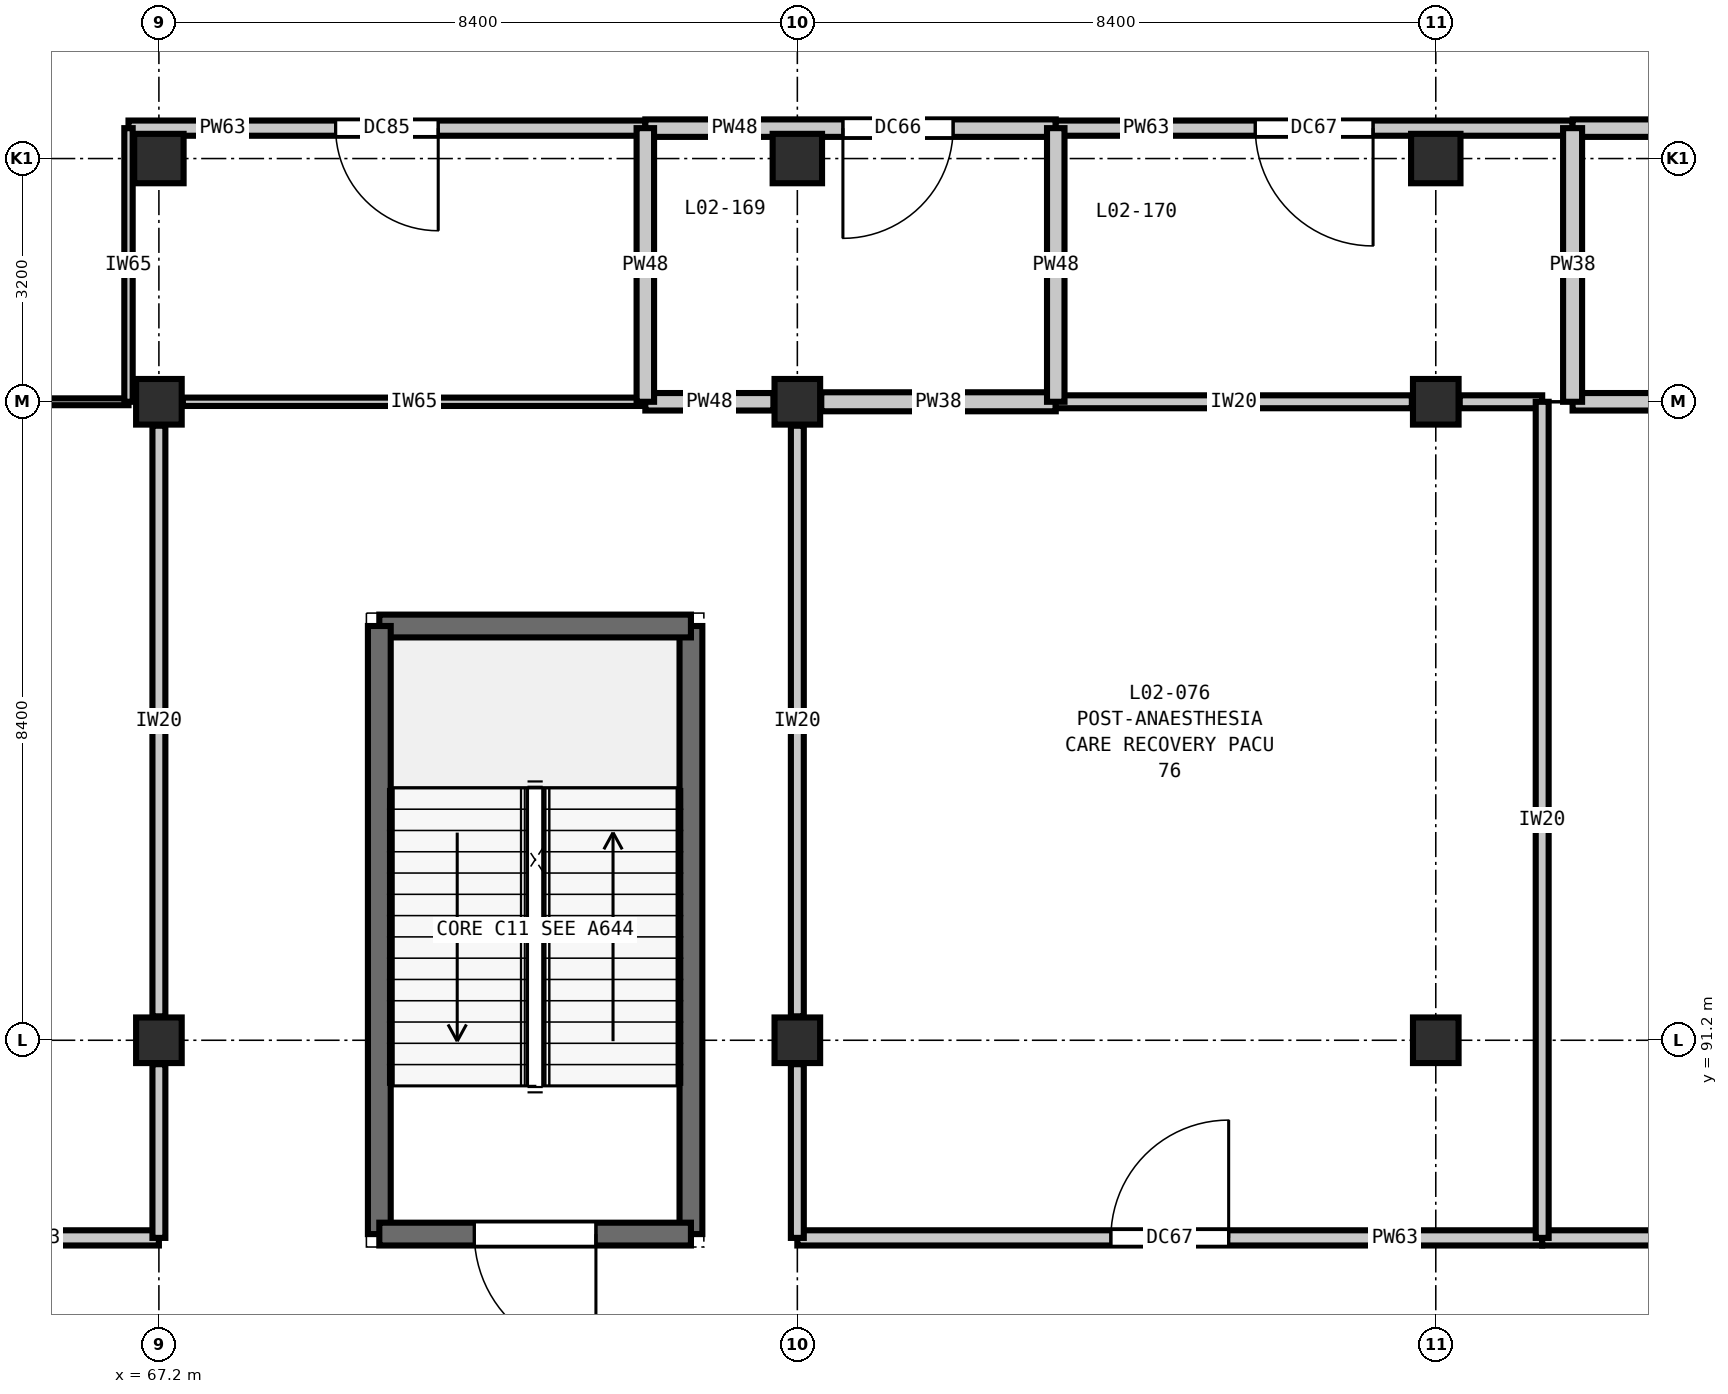
"""IFC4 building model, lengths in metres.
Left out: names, types, materials, properties, quantities, classifications, styles, units other than length and angle.
Written with IfcOpenShell. Run it as: python <this file> out.ifc"""

import sys

from ifc_helpers import new_model, si_unit, direction, frame, frame_2d, origin, origin_2d, place, context, subcontext, project, spatial, rectangle, extrude, element, fill, save


model = new_model("IFC4")
c1 = context("Model", 3, precision=1e-05, world=origin(), true_north=direction((0.0, 1.0)))
c2 = subcontext(c1, "Body", "Model", "MODEL_VIEW")
j1 = project(units=[si_unit("LENGTHUNIT", "METRE"), si_unit("PLANEANGLEUNIT", "RADIAN")], contexts=[c1])
p1 = place(None, origin())
s1 = spatial("IfcSite", under=j1, at=p1, CompositionType="ELEMENT")
p2 = place(p1, origin())
s2 = spatial("IfcBuilding", under=s1, at=p2, CompositionType="ELEMENT")
p3 = place(p2, frame((0.0, 0.0, 10.8)))
s3 = spatial("IfcBuildingStorey", under=s2, at=p3, CompositionType="ELEMENT", Elevation=10.8)
for number, where, z_axis, x_axis in (
    (1, (67.2, 91.2, 0.0), (0.0, 0.0, 1.0), (1.0, 0.0, 0.0)),
    (2, (67.2, 99.6, 0.0), (0.0, 0.0, 1.0), (1.0, 0.0, 0.0)),
):
    element("IfcColumn", number, at=place(p3, frame(where, z_axis=z_axis, x_axis=x_axis)), inside=s3, PredefinedType="COLUMN", context=c2, shape_type="SweptSolid", body=[
        extrude(rectangle(XDim=0.6, YDim=0.6, at=origin_2d()), origin(), (0.0, 0.0, 1.0), 5.4),
    ])
p4 = place(p3, frame((67.2, 102.8, 0.0), z_axis=(0.0, 0.0, 1.0), x_axis=(1.0, 0.0, 0.0)))
e3 = element("IfcColumn", 3, at=p4, inside=s3, PredefinedType="COLUMN", context=c2, shape_type="SweptSolid", body=[
    extrude(rectangle(XDim=0.65, YDim=0.65, at=origin_2d()), origin(), (0.0, 0.0, 1.0), 5.4),
])
for number, where, z_axis, x_axis in (
    (4, (75.6, 91.2, 0.0), (0.0, 0.0, 1.0), (1.0, 0.0, 0.0)),
    (5, (75.6, 99.6, 0.0), (0.0, 0.0, 1.0), (1.0, 0.0, 0.0)),
):
    element("IfcColumn", number, at=place(p3, frame(where, z_axis=z_axis, x_axis=x_axis)), inside=s3, PredefinedType="COLUMN", context=c2, shape_type="SweptSolid", body=[
        extrude(rectangle(XDim=0.6, YDim=0.6, at=origin_2d()), origin(), (0.0, 0.0, 1.0), 5.4),
    ])
p5 = place(p3, frame((75.6, 102.8, 0.0), z_axis=(0.0, 0.0, 1.0), x_axis=(1.0, 0.0, 0.0)))
e6 = element("IfcColumn", 6, at=p5, inside=s3, PredefinedType="COLUMN", context=c2, shape_type="SweptSolid", body=[
    extrude(rectangle(XDim=0.65, YDim=0.65, at=origin_2d()), origin(), (0.0, 0.0, 1.0), 5.4),
])
for number, where, z_axis, x_axis in (
    (7, (84.0, 91.2, 0.0), (0.0, 0.0, 1.0), (1.0, 0.0, 0.0)),
    (8, (84.0, 99.6, 0.0), (0.0, 0.0, 1.0), (1.0, 0.0, 0.0)),
):
    element("IfcColumn", number, at=place(p3, frame(where, z_axis=z_axis, x_axis=x_axis)), inside=s3, PredefinedType="COLUMN", context=c2, shape_type="SweptSolid", body=[
        extrude(rectangle(XDim=0.6, YDim=0.6, at=origin_2d()), origin(), (0.0, 0.0, 1.0), 5.4),
    ])
p6 = place(p3, frame((84.0, 102.8, 0.0), z_axis=(0.0, 0.0, 1.0), x_axis=(1.0, 0.0, 0.0)))
e9 = element("IfcColumn", 9, at=p6, inside=s3, PredefinedType="COLUMN", context=c2, shape_type="SweptSolid", body=[
    extrude(rectangle(XDim=0.65, YDim=0.65, at=origin_2d()), origin(), (0.0, 0.0, 1.0), 5.4),
])
p7 = place(p3, frame((74.2, 88.65, 0.0), z_axis=(0.0, 0.0, 1.0), x_axis=(0.0, 1.0, 0.0)))
e10 = element("IfcWall", 10, at=p7, inside=s3, PredefinedType="SHEAR", context=c2, shape_type="SweptSolid", body=[
    extrude(rectangle(XDim=8.0, YDim=0.3, at=frame_2d((4.0, 0.0))), origin(), (0.0, 0.0, 1.0), 5.4),
])
p8 = place(p3, frame((74.2, 96.65, 0.0), z_axis=(0.0, 0.0, 1.0), x_axis=(-1.0, 0.0, 0.0)))
e11 = element("IfcWall", 11, at=p8, inside=s3, PredefinedType="SHEAR", context=c2, shape_type="SweptSolid", body=[
    extrude(rectangle(XDim=4.1, YDim=0.3, at=frame_2d((2.05, 0.0))), origin(), (0.0, 0.0, 1.0), 5.4),
])
p9 = place(p3, frame((70.1, 96.65, 0.0), z_axis=(0.0, 0.0, 1.0), x_axis=(0.0, -1.0, 0.0)))
e12 = element("IfcWall", 12, at=p9, inside=s3, PredefinedType="SHEAR", context=c2, shape_type="SweptSolid", body=[
    extrude(rectangle(XDim=8.0, YDim=0.3, at=frame_2d((4.0, 0.0))), origin(), (0.0, 0.0, 1.0), 5.4),
])
p10 = place(p3, frame((70.1, 88.65, 0.0), z_axis=(0.0, 0.0, 1.0), x_axis=(1.0, 0.0, 0.0)))
e13 = element("IfcWall", 13, at=p10, inside=s3, PredefinedType="SHEAR", context=c2, shape_type="SweptSolid", body=[
    extrude(rectangle(XDim=4.1, YDim=0.3, at=frame_2d((2.05, 0.0))), origin(), (0.0, 0.0, 1.0), 5.4),
])
p11 = place(p10, frame((1.25, 0.0, 0.0)))
e14 = element("IfcOpeningElement", 14, at=p11, cuts=e13, PredefinedType="OPENING", context=c2, shape_type="SweptSolid", body=[
    extrude(rectangle(XDim=1.6, YDim=2.25, at=frame_2d((0.8, 1.125))), frame((0.0, 0.16, 0.0), z_axis=(0.0, -1.0, 0.0), x_axis=(1.0, 0.0, 0.0)), (0.0, 0.0, 1.0), 0.32),
])
p12 = place(p3, frame((58.8, 88.6, 0.0), z_axis=(0.0, 0.0, 1.0), x_axis=(1.0, 0.0, 0.0)))
e15 = element("IfcWall", 15, at=p12, inside=s3, PredefinedType="PARTITIONING", context=c2, shape_type="SweptSolid", body=[
    extrude(rectangle(XDim=8.4, YDim=0.2, at=frame_2d((4.2, 0.0))), origin(), (0.0, 0.0, 1.0), 5.07),
])
p13 = place(p12, frame((3.475, 0.0, 0.0)))
e16 = element("IfcOpeningElement", 16, at=p13, cuts=e15, PredefinedType="OPENING", context=c2, shape_type="SweptSolid", body=[
    extrude(rectangle(XDim=1.45, YDim=2.25, at=frame_2d((0.725, 1.125))), frame((0.0, 0.11, 0.0), z_axis=(0.0, -1.0, 0.0), x_axis=(1.0, 0.0, 0.0)), (0.0, 0.0, 1.0), 0.22),
])
p14 = place(p3, frame((75.6, 88.6, 0.0), z_axis=(0.0, 0.0, 1.0), x_axis=(1.0, 0.0, 0.0)))
e17 = element("IfcWall", 17, at=p14, inside=s3, PredefinedType="PARTITIONING", context=c2, shape_type="SweptSolid", body=[
    extrude(rectangle(XDim=9.8, YDim=0.2, at=frame_2d((4.9, 0.0))), origin(), (0.0, 0.0, 1.0), 5.07),
])
p15 = place(p14, frame((4.125, 0.0, 0.0)))
e18 = element("IfcOpeningElement", 18, at=p15, cuts=e17, PredefinedType="OPENING", context=c2, shape_type="SweptSolid", body=[
    extrude(rectangle(XDim=1.55, YDim=2.25, at=frame_2d((0.775, 1.125))), frame((0.0, 0.11, 0.0), z_axis=(0.0, -1.0, 0.0), x_axis=(1.0, 0.0, 0.0)), (0.0, 0.0, 1.0), 0.22),
])
p16 = place(p3, frame((85.4, 88.6, 0.0), z_axis=(0.0, 0.0, 1.0), x_axis=(1.0, 0.0, 0.0)))
e19 = element("IfcWall", 19, at=p16, inside=s3, PredefinedType="PARTITIONING", context=c2, shape_type="SweptSolid", body=[
    extrude(rectangle(XDim=8.4, YDim=0.2, at=frame_2d((4.2, 0.0))), origin(), (0.0, 0.0, 1.0), 5.07),
])
p17 = place(p16, frame((3.35, 0.0, 0.0)))
e20 = element("IfcOpeningElement", 20, at=p17, cuts=e19, PredefinedType="OPENING", context=c2, shape_type="SweptSolid", body=[
    extrude(rectangle(XDim=1.7, YDim=2.3, at=frame_2d((0.85, 1.15))), frame((0.0, 0.11, 0.0), z_axis=(0.0, -1.0, 0.0), x_axis=(1.0, 0.0, 0.0)), (0.0, 0.0, 1.0), 0.22),
])
p18 = place(p3, frame((63.6, 99.6, 0.0), z_axis=(0.0, 0.0, 1.0), x_axis=(1.0, 0.0, 0.0)))
e21 = element("IfcWall", 21, at=p18, inside=s3, PredefinedType="PARTITIONING", context=c2, shape_type="SweptSolid", body=[
    extrude(rectangle(XDim=3.2, YDim=0.09, at=frame_2d((1.6, 0.0))), origin(), (0.0, 0.0, 1.0), 4.735),
])
p19 = place(p3, frame((67.515, 99.6, 0.0), z_axis=(0.0, 0.0, 1.0), x_axis=(1.0, 0.0, 0.0)))
e22 = element("IfcWall", 22, at=p19, inside=s3, PredefinedType="PARTITIONING", context=c2, shape_type="SweptSolid", body=[
    extrude(rectangle(XDim=6.085, YDim=0.11, at=frame_2d((3.042, 0.0))), origin(), (0.0, 0.0, 1.0), 4.735),
])
p20 = place(p3, frame((73.6, 99.6, 0.0), z_axis=(0.0, 0.0, 1.0), x_axis=(1.0, 0.0, 0.0)))
e23 = element("IfcWall", 23, at=p20, inside=s3, PredefinedType="PARTITIONING", context=c2, shape_type="SweptSolid", body=[
    extrude(rectangle(XDim=1.685, YDim=0.23, at=frame_2d((0.842, 0.0))), origin(), (0.0, 0.0, 1.0), 4.735),
])
p21 = place(p3, frame((75.915, 99.6, 0.0), z_axis=(0.0, 0.0, 1.0), x_axis=(1.0, 0.0, 0.0)))
e24 = element("IfcWall", 24, at=p21, inside=s3, PredefinedType="PARTITIONING", context=c2, shape_type="SweptSolid", body=[
    extrude(rectangle(XDim=3.085, YDim=0.25, at=frame_2d((1.542, 0.0))), origin(), (0.0, 0.0, 1.0), 4.735),
])
p22 = place(p3, frame((79.0, 99.6, 0.0), z_axis=(0.0, 0.0, 1.0), x_axis=(1.0, 0.0, 0.0)))
e25 = element("IfcWall", 25, at=p22, inside=s3, PredefinedType="PARTITIONING", context=c2, shape_type="SweptSolid", body=[
    extrude(rectangle(XDim=4.685, YDim=0.17, at=frame_2d((2.343, 0.0))), origin(), (0.0, 0.0, 1.0), 4.735),
])
p23 = place(p3, frame((84.315, 99.6, 0.0), z_axis=(0.0, 0.0, 1.0), x_axis=(1.0, 0.0, 0.0)))
e26 = element("IfcWall", 26, at=p23, inside=s3, PredefinedType="PARTITIONING", context=c2, shape_type="SweptSolid", body=[
    extrude(rectangle(XDim=1.085, YDim=0.17, at=frame_2d((0.542, 0.0))), origin(), (0.0, 0.0, 1.0), 4.735),
])
p24 = place(p3, frame((85.8, 99.6, 0.0), z_axis=(0.0, 0.0, 1.0), x_axis=(1.0, 0.0, 0.0)))
e27 = element("IfcWall", 27, at=p24, inside=s3, PredefinedType="PARTITIONING", context=c2, shape_type="SweptSolid", body=[
    extrude(rectangle(XDim=5.4, YDim=0.23, at=frame_2d((2.7, 0.0))), origin(), (0.0, 0.0, 1.0), 4.735),
])
p25 = place(p3, frame((66.8, 103.2, 0.0), z_axis=(0.0, 0.0, 1.0), x_axis=(1.0, 0.0, 0.0)))
e28 = element("IfcWall", 28, at=p25, inside=s3, PredefinedType="PARTITIONING", context=c2, shape_type="SweptSolid", body=[
    extrude(rectangle(XDim=6.8, YDim=0.2, at=frame_2d((3.4, 0.0))), origin(), (0.0, 0.0, 1.0), 5.07),
])
p26 = place(p25, frame((2.725, 0.0, 0.0)))
e29 = element("IfcOpeningElement", 29, at=p26, cuts=e28, PredefinedType="OPENING", context=c2, shape_type="SweptSolid", body=[
    extrude(rectangle(XDim=1.35, YDim=2.2, at=frame_2d((0.675, 1.1))), frame((0.0, 0.11, 0.0), z_axis=(0.0, -1.0, 0.0), x_axis=(1.0, 0.0, 0.0)), (0.0, 0.0, 1.0), 0.22),
])
p27 = place(p3, frame((73.6, 103.2, 0.0), z_axis=(0.0, 0.0, 1.0), x_axis=(1.0, 0.0, 0.0)))
e30 = element("IfcWall", 30, at=p27, inside=s3, PredefinedType="PARTITIONING", context=c2, shape_type="SweptSolid", body=[
    extrude(rectangle(XDim=5.4, YDim=0.23, at=frame_2d((2.7, 0.0))), origin(), (0.0, 0.0, 1.0), 5.07),
])
p28 = place(p27, frame((2.6, 0.0, 0.0)))
e31 = element("IfcOpeningElement", 31, at=p28, cuts=e30, PredefinedType="OPENING", context=c2, shape_type="SweptSolid", body=[
    extrude(rectangle(XDim=1.45, YDim=2.25, at=frame_2d((0.725, 1.125))), frame((0.0, 0.125, 0.0), z_axis=(0.0, -1.0, 0.0), x_axis=(1.0, 0.0, 0.0)), (0.0, 0.0, 1.0), 0.25),
])
p29 = place(p3, frame((79.0, 103.2, 0.0), z_axis=(0.0, 0.0, 1.0), x_axis=(1.0, 0.0, 0.0)))
e32 = element("IfcWall", 32, at=p29, inside=s3, PredefinedType="PARTITIONING", context=c2, shape_type="SweptSolid", body=[
    extrude(rectangle(XDim=6.8, YDim=0.2, at=frame_2d((3.4, 0.0))), origin(), (0.0, 0.0, 1.0), 5.07),
])
p30 = place(p29, frame((2.625, 0.0, 0.0)))
e33 = element("IfcOpeningElement", 33, at=p30, cuts=e32, PredefinedType="OPENING", context=c2, shape_type="SweptSolid", body=[
    extrude(rectangle(XDim=1.55, YDim=2.25, at=frame_2d((0.775, 1.125))), frame((0.0, 0.11, 0.0), z_axis=(0.0, -1.0, 0.0), x_axis=(1.0, 0.0, 0.0)), (0.0, 0.0, 1.0), 0.22),
])
p31 = place(p3, frame((85.8, 103.2, 0.0), z_axis=(0.0, 0.0, 1.0), x_axis=(1.0, 0.0, 0.0)))
e34 = element("IfcWall", 34, at=p31, inside=s3, PredefinedType="PARTITIONING", context=c2, shape_type="SweptSolid", body=[
    extrude(rectangle(XDim=5.4, YDim=0.23, at=frame_2d((2.7, 0.0))), origin(), (0.0, 0.0, 1.0), 5.07),
])
p32 = place(p31, frame((1.85, 0.0, 0.0)))
e35 = element("IfcOpeningElement", 35, at=p32, cuts=e34, PredefinedType="OPENING", context=c2, shape_type="SweptSolid", body=[
    extrude(rectangle(XDim=1.7, YDim=2.3, at=frame_2d((0.85, 1.15))), frame((0.0, 0.125, 0.0), z_axis=(0.0, -1.0, 0.0), x_axis=(1.0, 0.0, 0.0)), (0.0, 0.0, 1.0), 0.25),
])
p33 = place(p3, frame((66.8, 99.6, 0.0), z_axis=(0.0, 0.0, 1.0), x_axis=(0.0, 1.0, 0.0)))
e36 = element("IfcWall", 36, at=p33, inside=s3, PredefinedType="PARTITIONING", context=c2, shape_type="SweptSolid", body=[
    extrude(rectangle(XDim=3.6, YDim=0.11, at=frame_2d((1.8, 0.0))), origin(), (0.0, 0.0, 1.0), 5.07),
])
p34 = place(p3, frame((67.2, 91.515, 0.0), z_axis=(0.0, 0.0, 1.0), x_axis=(0.0, 1.0, 0.0)))
e37 = element("IfcWall", 37, at=p34, inside=s3, PredefinedType="PARTITIONING", context=c2, shape_type="SweptSolid", body=[
    extrude(rectangle(XDim=7.77, YDim=0.17, at=frame_2d((3.885, 0.0))), origin(), (0.0, 0.0, 1.0), 4.735),
])
p35 = place(p3, frame((67.2, 88.6, 0.0), z_axis=(0.0, 0.0, 1.0), x_axis=(0.0, 1.0, 0.0)))
e38 = element("IfcWall", 38, at=p35, inside=s3, PredefinedType="PARTITIONING", context=c2, shape_type="SweptSolid", body=[
    extrude(rectangle(XDim=2.285, YDim=0.17, at=frame_2d((1.143, 0.0))), origin(), (0.0, 0.0, 1.0), 4.735),
])
p36 = place(p3, frame((73.6, 99.6, 0.0), z_axis=(0.0, 0.0, 1.0), x_axis=(0.0, 1.0, 0.0)))
e39 = element("IfcWall", 39, at=p36, inside=s3, PredefinedType="PARTITIONING", context=c2, shape_type="SweptSolid", body=[
    extrude(rectangle(XDim=3.6, YDim=0.23, at=frame_2d((1.8, 0.0))), origin(), (0.0, 0.0, 1.0), 5.07),
])
p37 = place(p3, frame((75.6, 91.515, 0.0), z_axis=(0.0, 0.0, 1.0), x_axis=(0.0, 1.0, 0.0)))
e40 = element("IfcWall", 40, at=p37, inside=s3, PredefinedType="PARTITIONING", context=c2, shape_type="SweptSolid", body=[
    extrude(rectangle(XDim=7.77, YDim=0.17, at=frame_2d((3.885, 0.0))), origin(), (0.0, 0.0, 1.0), 4.486),
])
p38 = place(p3, frame((75.6, 88.6, 0.0), z_axis=(0.0, 0.0, 1.0), x_axis=(0.0, 1.0, 0.0)))
e41 = element("IfcWall", 41, at=p38, inside=s3, PredefinedType="PARTITIONING", context=c2, shape_type="SweptSolid", body=[
    extrude(rectangle(XDim=2.285, YDim=0.17, at=frame_2d((1.143, 0.0))), origin(), (0.0, 0.0, 1.0), 4.486),
])
p39 = place(p3, frame((79.0, 99.6, 0.0), z_axis=(0.0, 0.0, 1.0), x_axis=(0.0, 1.0, 0.0)))
e42 = element("IfcWall", 42, at=p39, inside=s3, PredefinedType="PARTITIONING", context=c2, shape_type="SweptSolid", body=[
    extrude(rectangle(XDim=3.6, YDim=0.23, at=frame_2d((1.8, 0.0))), origin(), (0.0, 0.0, 1.0), 5.07),
])
p40 = place(p3, frame((85.4, 88.6, 0.0), z_axis=(0.0, 0.0, 1.0), x_axis=(0.0, 1.0, 0.0)))
e43 = element("IfcWall", 43, at=p40, inside=s3, PredefinedType="PARTITIONING", context=c2, shape_type="SweptSolid", body=[
    extrude(rectangle(XDim=11.0, YDim=0.17, at=frame_2d((5.5, 0.0))), origin(), (0.0, 0.0, 1.0), 5.07),
])
p41 = place(p3, frame((85.8, 99.6, 0.0), z_axis=(0.0, 0.0, 1.0), x_axis=(0.0, 1.0, 0.0)))
e44 = element("IfcWall", 44, at=p41, inside=s3, PredefinedType="PARTITIONING", context=c2, shape_type="SweptSolid", body=[
    extrude(rectangle(XDim=3.6, YDim=0.25, at=frame_2d((1.8, 0.0))), origin(), (0.0, 0.0, 1.0), 5.07),
])
p42 = place(p11, frame((1.6, 0.0, 0.0), z_axis=(0.0, 0.0, 1.0), x_axis=(-1.0, 0.0, 0.0)))
e45 = element("IfcDoor", 45, at=p42, inside=s3, OperationType="SINGLE_SWING_LEFT", PredefinedType="DOOR", context=c2, shape_type="SweptSolid", body=[
    extrude(rectangle(XDim=1.6, YDim=2.25, at=frame_2d((0.8, 1.125))), frame((0.0, 0.025, 0.0), z_axis=(0.0, -1.0, 0.0), x_axis=(1.0, 0.0, 0.0)), (0.0, 0.0, 1.0), 0.05),
])
fill(e14, e45)
p43 = place(p15, origin())
e46 = element("IfcDoor", 46, at=p43, inside=s3, OperationType="SINGLE_SWING_RIGHT", PredefinedType="DOOR", context=c2, shape_type="SweptSolid", body=[
    extrude(rectangle(XDim=1.55, YDim=2.25, at=frame_2d((0.775, 1.125))), frame((0.0, 0.025, 0.0), z_axis=(0.0, -1.0, 0.0), x_axis=(1.0, 0.0, 0.0)), (0.0, 0.0, 1.0), 0.05),
])
fill(e18, e46)
p44 = place(p26, frame((1.35, 0.0, 0.0), z_axis=(0.0, 0.0, 1.0), x_axis=(-1.0, 0.0, 0.0)))
e47 = element("IfcDoor", 47, at=p44, inside=s3, OperationType="SINGLE_SWING_LEFT", PredefinedType="DOOR", context=c2, shape_type="SweptSolid", body=[
    extrude(rectangle(XDim=1.35, YDim=2.2, at=frame_2d((0.675, 1.1))), frame((0.0, 0.025, 0.0), z_axis=(0.0, -1.0, 0.0), x_axis=(1.0, 0.0, 0.0)), (0.0, 0.0, 1.0), 0.05),
])
fill(e29, e47)
p45 = place(p28, frame((1.45, 0.0, 0.0), z_axis=(0.0, 0.0, 1.0), x_axis=(-1.0, 0.0, 0.0)))
e48 = element("IfcDoor", 48, at=p45, inside=s3, OperationType="SINGLE_SWING_RIGHT", PredefinedType="DOOR", context=c2, shape_type="SweptSolid", body=[
    extrude(rectangle(XDim=1.45, YDim=2.25, at=frame_2d((0.725, 1.125))), frame((0.0, 0.025, 0.0), z_axis=(0.0, -1.0, 0.0), x_axis=(1.0, 0.0, 0.0)), (0.0, 0.0, 1.0), 0.05),
])
fill(e31, e48)
p46 = place(p30, frame((1.55, 0.0, 0.0), z_axis=(0.0, 0.0, 1.0), x_axis=(-1.0, 0.0, 0.0)))
e49 = element("IfcDoor", 49, at=p46, inside=s3, OperationType="SINGLE_SWING_LEFT", PredefinedType="DOOR", context=c2, shape_type="SweptSolid", body=[
    extrude(rectangle(XDim=1.55, YDim=2.25, at=frame_2d((0.775, 1.125))), frame((0.0, 0.025, 0.0), z_axis=(0.0, -1.0, 0.0), x_axis=(1.0, 0.0, 0.0)), (0.0, 0.0, 1.0), 0.05),
])
fill(e33, e49)
save(model, sys.argv[1])
